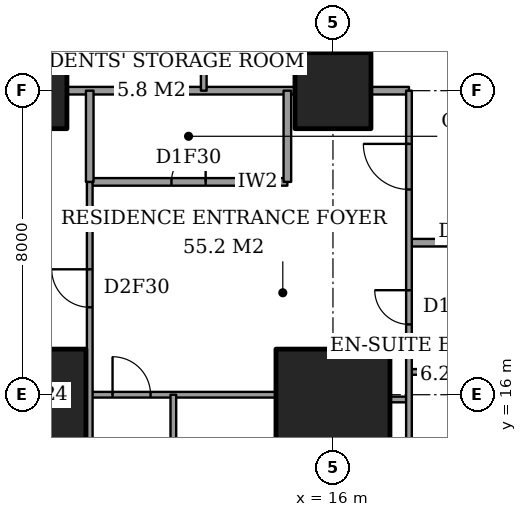
"""IFC4 building model, lengths in metres.
Left out: names, types, materials, properties, quantities, classifications, styles, units other than length and angle.
Written with IfcOpenShell. Run it as: python <this file> out.ifc"""

import sys

from ifc_helpers import new_model, si_unit, direction, frame, frame_2d, origin, origin_2d, place, context, subcontext, project, spatial, rectangle, extrude, element, fill, save


model = new_model("IFC4")
c1 = context("Model", 3, precision=1e-05, world=origin(), true_north=direction((0.0, 1.0)))
c2 = subcontext(c1, "Body", "Model", "MODEL_VIEW")
j1 = project(units=[si_unit("LENGTHUNIT", "METRE"), si_unit("PLANEANGLEUNIT", "RADIAN")], contexts=[c1])
p1 = place(None, origin())
s1 = spatial("IfcSite", under=j1, at=p1, CompositionType="ELEMENT")
p2 = place(p1, origin())
s2 = spatial("IfcBuilding", under=s1, at=p2, CompositionType="ELEMENT")
p3 = place(p2, frame((0.0, 0.0, 80.0)))
s3 = spatial("IfcBuildingStorey", under=s2, at=p3, CompositionType="ELEMENT", Elevation=80.0)
p4 = place(p3, frame((8.0, 16.0, 0.0), z_axis=(0.0, 0.0, 1.0), x_axis=(1.0, 0.0, 0.0)))
e1 = element("IfcColumn", 1, at=p4, inside=s3, PredefinedType="COLUMN", context=c2, shape_type="SweptSolid", body=[
    extrude(rectangle(XDim=3.0, YDim=2.4, at=origin_2d()), origin(), (0.0, 0.0, 1.0), 3.6),
])
p5 = place(p3, frame((8.0, 24.0, 0.0), z_axis=(0.0, 0.0, 1.0), x_axis=(1.0, 0.0, 0.0)))
e2 = element("IfcColumn", 2, at=p5, inside=s3, PredefinedType="COLUMN", context=c2, shape_type="SweptSolid", body=[
    extrude(rectangle(XDim=2.0, YDim=2.0, at=origin_2d()), origin(), (0.0, 0.0, 1.0), 3.6),
])
p6 = place(p3, frame((16.0, 16.0, 0.0), z_axis=(0.0, 0.0, 1.0), x_axis=(1.0, 0.0, 0.0)))
e3 = element("IfcColumn", 3, at=p6, inside=s3, PredefinedType="COLUMN", context=c2, shape_type="SweptSolid", body=[
    extrude(rectangle(XDim=3.0, YDim=2.4, at=origin_2d()), origin(), (0.0, 0.0, 1.0), 3.6),
])
p7 = place(p3, frame((16.0, 24.0, 0.0), z_axis=(0.0, 0.0, 1.0), x_axis=(1.0, 0.0, 0.0)))
e4 = element("IfcColumn", 4, at=p7, inside=s3, PredefinedType="COLUMN", context=c2, shape_type="SweptSolid", body=[
    extrude(rectangle(XDim=2.0, YDim=2.0, at=origin_2d()), origin(), (0.0, 0.0, 1.0), 3.6),
])
p8 = place(p3, frame((17.5, 15.875, 0.0), z_axis=(0.0, 0.0, 1.0), x_axis=(1.0, 0.0, 0.0)))
e5 = element("IfcWall", 5, at=p8, inside=s3, PredefinedType="PARTITIONING", context=c2, shape_type="SweptSolid", body=[
    extrude(rectangle(XDim=0.5, YDim=0.15, at=frame_2d((0.25, 0.0))), origin(), (0.0, 0.0, 1.0), 2.634),
])
p9 = place(p3, frame((9.6, 16.0, 0.0), z_axis=(0.0, 0.0, 1.0), x_axis=(1.0, 0.0, 0.0)))
e6 = element("IfcWall", 6, at=p9, inside=s3, PredefinedType="PARTITIONING", context=c2, shape_type="SweptSolid", body=[
    extrude(rectangle(XDim=4.9, YDim=0.15, at=frame_2d((2.45, 0.0))), origin(), (0.0, 0.0, 1.0), 2.634),
])
p10 = place(p9, frame((0.6, 0.0, 0.0)))
e7 = element("IfcOpeningElement", 7, at=p10, cuts=e6, PredefinedType="OPENING", context=c2, shape_type="SweptSolid", body=[
    extrude(rectangle(XDim=1.0, YDim=2.1, at=frame_2d((0.5, 1.05))), frame((0.0, 0.085, 0.0), z_axis=(0.0, -1.0, 0.0), x_axis=(1.0, 0.0, 0.0)), (0.0, 0.0, 1.0), 0.17),
])
p11 = place(p3, frame((18.0, 16.6, 0.0), z_axis=(0.0, 0.0, 1.0), x_axis=(1.0, 0.0, 0.0)))
e8 = element("IfcWall", 8, at=p11, inside=s3, PredefinedType="PARTITIONING", context=c2, shape_type="SweptSolid", body=[
    extrude(rectangle(XDim=6.0, YDim=0.15, at=frame_2d((3.0, 0.0))), origin(), (0.0, 0.0, 1.0), 3.35),
])
p12 = place(p3, frame((18.0, 20.0, 0.0), z_axis=(0.0, 0.0, 1.0), x_axis=(1.0, 0.0, 0.0)))
e9 = element("IfcWall", 9, at=p12, inside=s3, PredefinedType="PARTITIONING", context=c2, shape_type="SweptSolid", body=[
    extrude(rectangle(XDim=6.0, YDim=0.2, at=frame_2d((3.0, 0.0))), origin(), (0.0, 0.0, 1.0), 3.35),
])
p13 = place(p3, frame((9.6, 21.6, 0.0), z_axis=(0.0, 0.0, 1.0), x_axis=(1.0, 0.0, 0.0)))
e10 = element("IfcWall", 10, at=p13, inside=s3, PredefinedType="PARTITIONING", context=c2, shape_type="SweptSolid", body=[
    extrude(rectangle(XDim=5.2, YDim=0.2, at=frame_2d((2.6, 0.0))), origin(), (0.0, 0.0, 1.0), 3.35),
])
p14 = place(p13, frame((2.15, 0.0, 0.0)))
e11 = element("IfcOpeningElement", 11, at=p14, cuts=e10, PredefinedType="OPENING", context=c2, shape_type="SweptSolid", body=[
    extrude(rectangle(XDim=0.9, YDim=2.1, at=frame_2d((0.45, 1.05))), frame((0.0, 0.11, 0.0), z_axis=(0.0, -1.0, 0.0), x_axis=(1.0, 0.0, 0.0)), (0.0, 0.0, 1.0), 0.22),
])
p15 = place(p3, frame((9.0, 24.0, 0.0), z_axis=(0.0, 0.0, 1.0), x_axis=(1.0, 0.0, 0.0)))
e12 = element("IfcWall", 12, at=p15, inside=s3, PredefinedType="PARTITIONING", context=c2, shape_type="SweptSolid", body=[
    extrude(rectangle(XDim=6.0, YDim=0.2, at=frame_2d((3.0, 0.0))), origin(), (0.0, 0.0, 1.0), 3.35),
])
p16 = place(p3, frame((17.0, 24.0, 0.0), z_axis=(0.0, 0.0, 1.0), x_axis=(1.0, 0.0, 0.0)))
e13 = element("IfcWall", 13, at=p16, inside=s3, PredefinedType="PARTITIONING", context=c2, shape_type="SweptSolid", body=[
    extrude(rectangle(XDim=1.0, YDim=0.2, at=frame_2d((0.5, 0.0))), origin(), (0.0, 0.0, 1.0), 3.35),
])
p17 = place(p3, frame((9.6, 21.6, 0.0), z_axis=(0.0, 0.0, 1.0), x_axis=(0.0, 1.0, 0.0)))
e14 = element("IfcWall", 14, at=p17, inside=s3, PredefinedType="PARTITIONING", context=c2, shape_type="SweptSolid", body=[
    extrude(rectangle(XDim=2.4, YDim=0.2, at=frame_2d((1.2, 0.0))), origin(), (0.0, 0.0, 1.0), 3.35),
])
p18 = place(p3, frame((9.6, 10.6, 0.0), z_axis=(0.0, 0.0, 1.0), x_axis=(0.0, 1.0, 0.0)))
e15 = element("IfcWall", 15, at=p18, inside=s3, PredefinedType="PARTITIONING", context=c2, shape_type="SweptSolid", body=[
    extrude(rectangle(XDim=11.0, YDim=0.15, at=frame_2d((5.5, 0.0))), origin(), (0.0, 0.0, 1.0), 3.35),
])
p19 = place(p18, frame((7.7, 0.0, 0.0)))
e16 = element("IfcOpeningElement", 16, at=p19, cuts=e15, PredefinedType="OPENING", context=c2, shape_type="SweptSolid", body=[
    extrude(rectangle(XDim=1.0, YDim=2.1, at=frame_2d((0.5, 1.05))), frame((0.0, 0.085, 0.0), z_axis=(0.0, -1.0, 0.0), x_axis=(1.0, 0.0, 0.0)), (0.0, 0.0, 1.0), 0.17),
])
p20 = place(p3, frame((11.8, 10.6, 0.0), z_axis=(0.0, 0.0, 1.0), x_axis=(0.0, 1.0, 0.0)))
e17 = element("IfcWall", 17, at=p20, inside=s3, PredefinedType="PARTITIONING", context=c2, shape_type="SweptSolid", body=[
    extrude(rectangle(XDim=5.4, YDim=0.15, at=frame_2d((2.7, 0.0))), origin(), (0.0, 0.0, 1.0), 3.35),
])
p21 = place(p3, frame((12.6, 24.0, 0.0), z_axis=(0.0, 0.0, 1.0), x_axis=(0.0, 1.0, 0.0)))
e18 = element("IfcWall", 18, at=p21, inside=s3, PredefinedType="PARTITIONING", context=c2, shape_type="SweptSolid", body=[
    extrude(rectangle(XDim=1.6, YDim=0.15, at=frame_2d((0.8, 0.0))), origin(), (0.0, 0.0, 1.0), 3.35),
])
p22 = place(p3, frame((14.8, 21.6, 0.0), z_axis=(0.0, 0.0, 1.0), x_axis=(0.0, 1.0, 0.0)))
e19 = element("IfcWall", 19, at=p22, inside=s3, PredefinedType="PARTITIONING", context=c2, shape_type="SweptSolid", body=[
    extrude(rectangle(XDim=2.4, YDim=0.2, at=frame_2d((1.2, 0.0))), origin(), (0.0, 0.0, 1.0), 3.35),
])
p23 = place(p3, frame((18.0, 10.6, 0.0), z_axis=(0.0, 0.0, 1.0), x_axis=(0.0, 1.0, 0.0)))
e20 = element("IfcWall", 20, at=p23, inside=s3, PredefinedType="PARTITIONING", context=c2, shape_type="SweptSolid", body=[
    extrude(rectangle(XDim=13.4, YDim=0.15, at=frame_2d((6.7, 0.0))), origin(), (0.0, 0.0, 1.0), 3.35),
])
p24 = place(p23, frame((10.8, 0.0, 0.0)))
e21 = element("IfcOpeningElement", 21, at=p24, cuts=e20, PredefinedType="OPENING", context=c2, shape_type="SweptSolid", body=[
    extrude(rectangle(XDim=1.2, YDim=2.4, at=frame_2d((0.6, 1.2))), frame((0.0, 0.085, 0.0), z_axis=(0.0, -1.0, 0.0), x_axis=(1.0, 0.0, 0.0)), (0.0, 0.0, 1.0), 0.17),
])
p25 = place(p23, frame((7.25, 0.0, 0.0)))
e22 = element("IfcOpeningElement", 22, at=p25, cuts=e20, PredefinedType="OPENING", context=c2, shape_type="SweptSolid", body=[
    extrude(rectangle(XDim=0.9, YDim=2.1, at=frame_2d((0.45, 1.05))), frame((0.0, 0.085, 0.0), z_axis=(0.0, -1.0, 0.0), x_axis=(1.0, 0.0, 0.0)), (0.0, 0.0, 1.0), 0.17),
])
p26 = place(p19, origin())
e23 = element("IfcDoor", 23, at=p26, inside=s3, OperationType="SINGLE_SWING_LEFT", PredefinedType="DOOR", context=c2, shape_type="SweptSolid", body=[
    extrude(rectangle(XDim=1.0, YDim=2.1, at=frame_2d((0.5, 1.05))), frame((0.0, 0.025, 0.0), z_axis=(0.0, -1.0, 0.0), x_axis=(1.0, 0.0, 0.0)), (0.0, 0.0, 1.0), 0.05),
])
fill(e16, e23)
p27 = place(p14, origin())
e24 = element("IfcDoor", 24, at=p27, inside=s3, OperationType="SINGLE_SWING_LEFT", PredefinedType="DOOR", context=c2, shape_type="SweptSolid", body=[
    extrude(rectangle(XDim=0.9, YDim=2.1, at=frame_2d((0.45, 1.05))), frame((0.0, 0.025, 0.0), z_axis=(0.0, -1.0, 0.0), x_axis=(1.0, 0.0, 0.0)), (0.0, 0.0, 1.0), 0.05),
])
fill(e11, e24)
p28 = place(p24, origin())
e25 = element("IfcDoor", 25, at=p28, inside=s3, OperationType="SINGLE_SWING_LEFT", PredefinedType="DOOR", context=c2, shape_type="SweptSolid", body=[
    extrude(rectangle(XDim=1.2, YDim=2.4, at=frame_2d((0.6, 1.2))), frame((0.0, 0.025, 0.0), z_axis=(0.0, -1.0, 0.0), x_axis=(1.0, 0.0, 0.0)), (0.0, 0.0, 1.0), 0.05),
])
fill(e21, e25)
p29 = place(p10, origin())
e26 = element("IfcDoor", 26, at=p29, inside=s3, OperationType="SINGLE_SWING_RIGHT", PredefinedType="DOOR", context=c2, shape_type="SweptSolid", body=[
    extrude(rectangle(XDim=1.0, YDim=2.1, at=frame_2d((0.5, 1.05))), frame((0.0, 0.025, 0.0), z_axis=(0.0, -1.0, 0.0), x_axis=(1.0, 0.0, 0.0)), (0.0, 0.0, 1.0), 0.05),
])
fill(e7, e26)
p30 = place(p25, origin())
e27 = element("IfcDoor", 27, at=p30, inside=s3, OperationType="SINGLE_SWING_LEFT", PredefinedType="DOOR", context=c2, shape_type="SweptSolid", body=[
    extrude(rectangle(XDim=0.9, YDim=2.1, at=frame_2d((0.45, 1.05))), frame((0.0, 0.025, 0.0), z_axis=(0.0, -1.0, 0.0), x_axis=(1.0, 0.0, 0.0)), (0.0, 0.0, 1.0), 0.05),
])
fill(e22, e27)
save(model, sys.argv[1])
